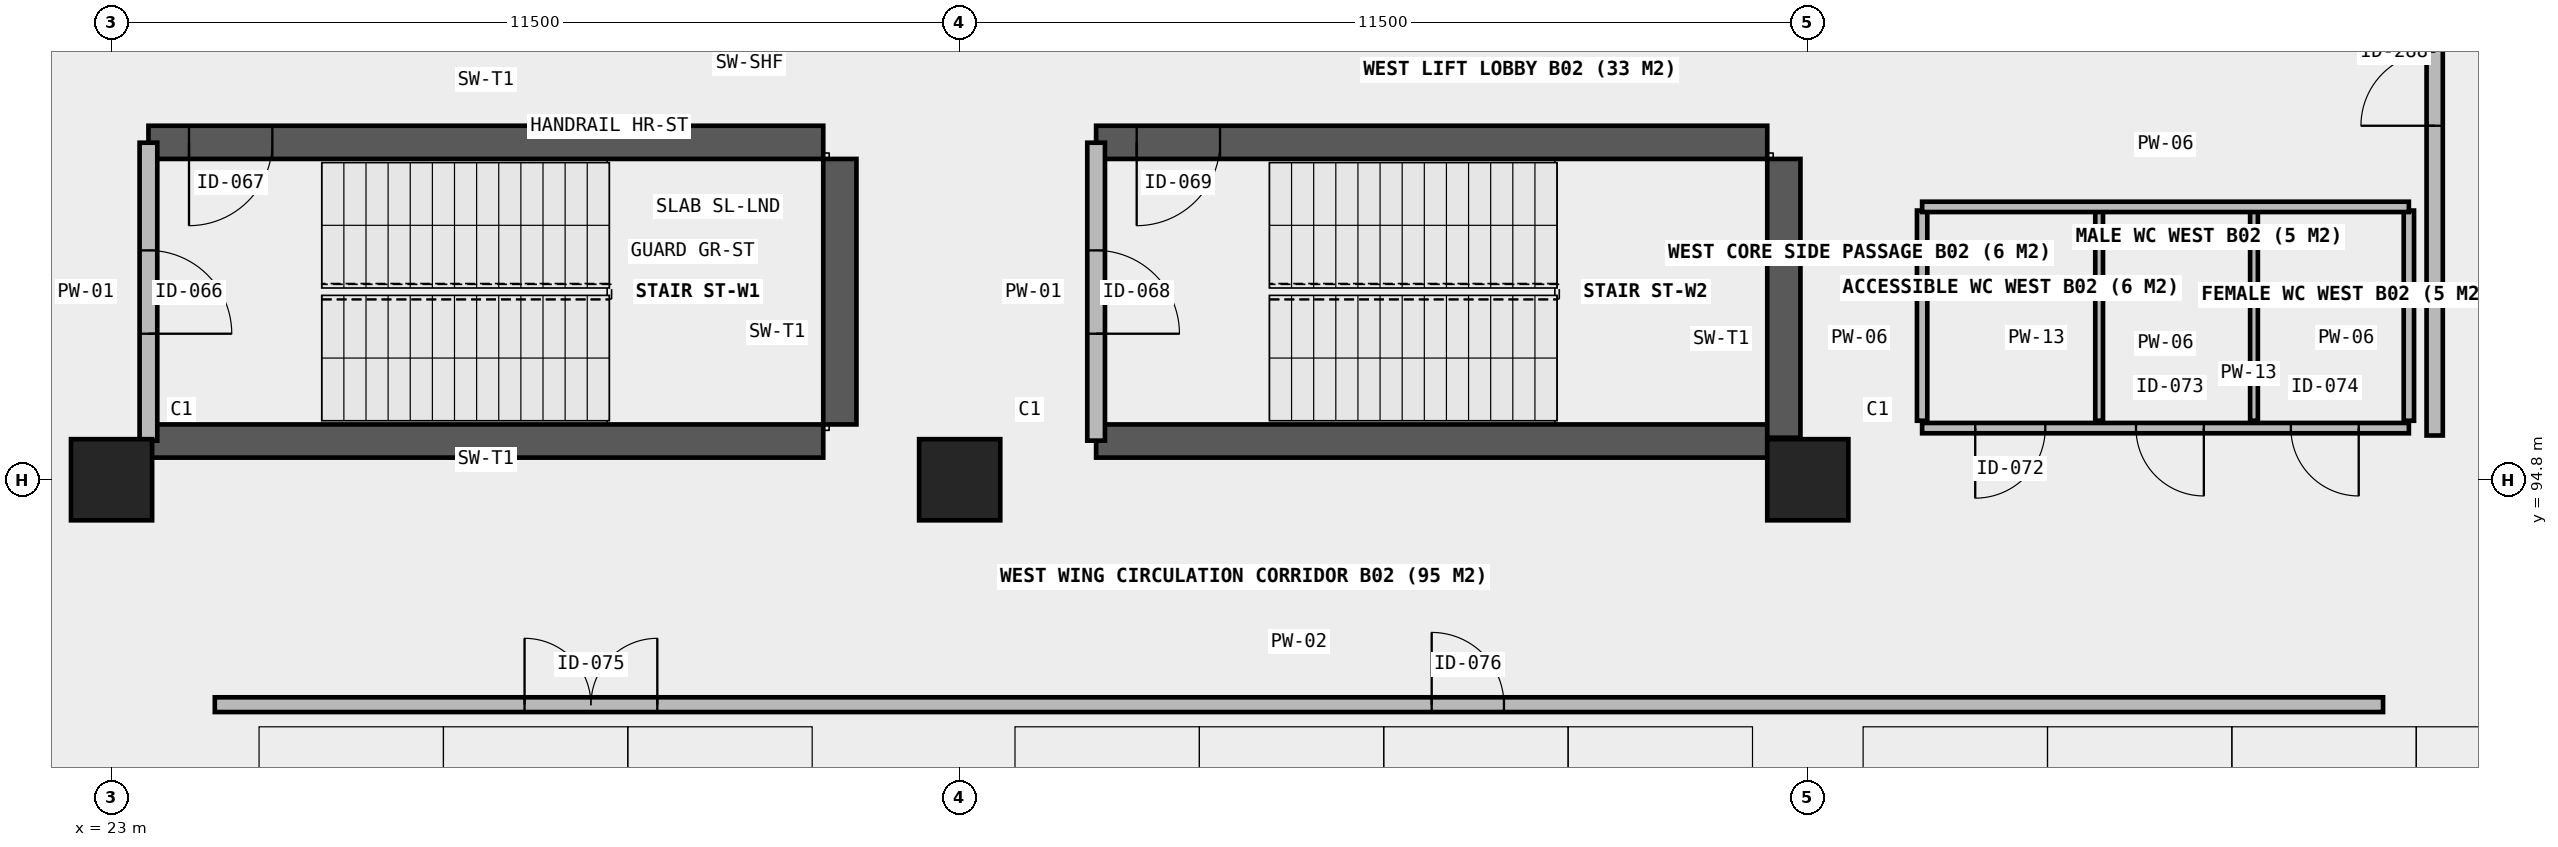
"""IFC4 building model, lengths in metres.
Left out: names, types, materials, properties, quantities, classifications, styles, units other than length and angle.
Written with IfcOpenShell. Run it as: python <this file> out.ifc"""

import sys

from ifc_helpers import new_model, si_unit, direction, frame, frame_2d, origin, origin_2d, place, context, subcontext, project, spatial, rectangle, extrude, element, fill, save


model = new_model("IFC4")
c1 = context("Model", 3, precision=1e-05, world=origin(), true_north=direction((0.0, 1.0)))
c2 = subcontext(c1, "Body", "Model", "MODEL_VIEW")
j1 = project(units=[si_unit("LENGTHUNIT", "METRE"), si_unit("PLANEANGLEUNIT", "RADIAN")], contexts=[c1])
p1 = place(None, origin())
s1 = spatial("IfcSite", under=j1, at=p1, CompositionType="ELEMENT")
p2 = place(p1, origin())
s2 = spatial("IfcBuilding", under=s1, at=p2, CompositionType="ELEMENT")
p3 = place(p2, frame((0.0, 0.0, -8.4)))
s3 = spatial("IfcBuildingStorey", under=s2, at=p3, CompositionType="ELEMENT", Elevation=-8.4)
for number, where, z_axis, x_axis in (
    (1, (23.0, 94.8, 0.0), (0.0, 0.0, 1.0), (1.0, 0.0, 0.0)),
    (2, (34.5, 94.8, 0.0), (0.0, 0.0, 1.0), (1.0, 0.0, 0.0)),
    (3, (46.0, 94.8, 0.0), (0.0, 0.0, 1.0), (1.0, 0.0, 0.0)),
):
    element("IfcColumn", number, at=place(p3, frame(where, z_axis=z_axis, x_axis=x_axis)), inside=s3, PredefinedType="COLUMN", context=c2, shape_type="SweptSolid", body=[
        extrude(rectangle(XDim=1.1, YDim=1.1, at=origin_2d()), origin(), (0.0, 0.0, 1.0), 4.2),
    ])
p4 = place(p3, frame((23.5, 95.325, 0.0), z_axis=(0.0, 0.0, 1.0), x_axis=(1.0, 0.0, 0.0)))
e4 = element("IfcWall", 4, at=p4, inside=s3, PredefinedType="SHEAR", context=c2, shape_type="SweptSolid", body=[
    extrude(rectangle(XDim=9.15, YDim=0.45, at=frame_2d((4.575, 0.0))), origin(), (0.0, 0.0, 1.0), 4.2),
])
p5 = place(p3, frame((23.5, 99.375, 0.0), z_axis=(0.0, 0.0, 1.0), x_axis=(1.0, 0.0, 0.0)))
e5 = element("IfcWall", 5, at=p5, inside=s3, PredefinedType="SHEAR", context=c2, shape_type="SweptSolid", body=[
    extrude(rectangle(XDim=9.15, YDim=0.45, at=frame_2d((4.575, 0.0))), origin(), (0.0, 0.0, 1.0), 4.2),
])
p6 = place(p5, frame((0.55, 0.0, 0.0)))
e6 = element("IfcOpeningElement", 6, at=p6, cuts=e5, PredefinedType="OPENING", context=c2, shape_type="SweptSolid", body=[
    extrude(rectangle(XDim=1.13, YDim=2.15, at=frame_2d((0.565, 1.075))), frame((0.0, 0.235, 0.0), z_axis=(0.0, -1.0, 0.0), x_axis=(1.0, 0.0, 0.0)), (0.0, 0.0, 1.0), 0.47),
])
p7 = place(p3, frame((32.875, 95.55, 0.0), z_axis=(0.0, 0.0, 1.0), x_axis=(0.0, 1.0, 0.0)))
e7 = element("IfcWall", 7, at=p7, inside=s3, PredefinedType="SHEAR", context=c2, shape_type="SweptSolid", body=[
    extrude(rectangle(XDim=3.6, YDim=0.45, at=frame_2d((1.8, 0.0))), origin(), (0.0, 0.0, 1.0), 4.2),
])
p8 = place(p3, frame((36.35, 95.325, 0.0), z_axis=(0.0, 0.0, 1.0), x_axis=(1.0, 0.0, 0.0)))
e8 = element("IfcWall", 8, at=p8, inside=s3, PredefinedType="SHEAR", context=c2, shape_type="SweptSolid", body=[
    extrude(rectangle(XDim=9.1, YDim=0.45, at=frame_2d((4.55, 0.0))), origin(), (0.0, 0.0, 1.0), 4.2),
])
p9 = place(p3, frame((36.35, 99.375, 0.0), z_axis=(0.0, 0.0, 1.0), x_axis=(1.0, 0.0, 0.0)))
e9 = element("IfcWall", 9, at=p9, inside=s3, PredefinedType="SHEAR", context=c2, shape_type="SweptSolid", body=[
    extrude(rectangle(XDim=9.1, YDim=0.45, at=frame_2d((4.55, 0.0))), origin(), (0.0, 0.0, 1.0), 4.2),
])
p10 = place(p9, frame((0.55, 0.0, 0.0)))
e10 = element("IfcOpeningElement", 10, at=p10, cuts=e9, PredefinedType="OPENING", context=c2, shape_type="SweptSolid", body=[
    extrude(rectangle(XDim=1.13, YDim=2.15, at=frame_2d((0.565, 1.075))), frame((0.0, 0.235, 0.0), z_axis=(0.0, -1.0, 0.0), x_axis=(1.0, 0.0, 0.0)), (0.0, 0.0, 1.0), 0.47),
])
p11 = place(p3, frame((45.675, 95.37, 0.0), z_axis=(0.0, 0.0, 1.0), x_axis=(0.0, 1.0, 0.0)))
e11 = element("IfcWall", 11, at=p11, inside=s3, PredefinedType="SHEAR", context=c2, shape_type="SweptSolid", body=[
    extrude(rectangle(XDim=3.78, YDim=0.45, at=frame_2d((1.89, 0.0))), origin(), (0.0, 0.0, 1.0), 4.2),
])
p12 = place(p3, frame((23.5, 95.33, 0.0), z_axis=(0.0, 0.0, 1.0), x_axis=(0.0, 1.0, 0.0)))
e12 = element("IfcWall", 12, at=p12, inside=s3, PredefinedType="SOLIDWALL", context=c2, shape_type="SweptSolid", body=[
    extrude(rectangle(XDim=4.04, YDim=0.24, at=frame_2d((2.02, 0.0))), origin(), (0.0, 0.0, 1.0), 3.9),
])
p13 = place(p12, frame((1.45, 0.0, 0.0)))
e13 = element("IfcOpeningElement", 13, at=p13, cuts=e12, PredefinedType="OPENING", context=c2, shape_type="SweptSolid", body=[
    extrude(rectangle(XDim=1.13, YDim=2.15, at=frame_2d((0.565, 1.075))), frame((0.0, 0.13, 0.0), z_axis=(0.0, -1.0, 0.0), x_axis=(1.0, 0.0, 0.0)), (0.0, 0.0, 1.0), 0.26),
])
p14 = place(p3, frame((36.35, 95.33, 0.0), z_axis=(0.0, 0.0, 1.0), x_axis=(0.0, 1.0, 0.0)))
e14 = element("IfcWall", 14, at=p14, inside=s3, PredefinedType="SOLIDWALL", context=c2, shape_type="SweptSolid", body=[
    extrude(rectangle(XDim=4.04, YDim=0.24, at=frame_2d((2.02, 0.0))), origin(), (0.0, 0.0, 1.0), 3.9),
])
p15 = place(p14, frame((1.45, 0.0, 0.0)))
e15 = element("IfcOpeningElement", 15, at=p15, cuts=e14, PredefinedType="OPENING", context=c2, shape_type="SweptSolid", body=[
    extrude(rectangle(XDim=1.13, YDim=2.15, at=frame_2d((0.565, 1.075))), frame((0.0, 0.13, 0.0), z_axis=(0.0, -1.0, 0.0), x_axis=(1.0, 0.0, 0.0)), (0.0, 0.0, 1.0), 0.26),
])
p16 = place(p3, frame((47.55, 95.5, 0.0), z_axis=(0.0, 0.0, 1.0), x_axis=(1.0, 0.0, 0.0)))
e16 = element("IfcWall", 16, at=p16, inside=s3, PredefinedType="PLUMBINGWALL", context=c2, shape_type="SweptSolid", body=[
    extrude(rectangle(XDim=6.6, YDim=0.14, at=frame_2d((3.3, 0.0))), origin(), (0.0, 0.0, 1.0), 3.9),
])
p17 = place(p16, frame((0.72, 0.0, 0.0)))
e17 = element("IfcOpeningElement", 17, at=p17, cuts=e16, PredefinedType="OPENING", context=c2, shape_type="SweptSolid", body=[
    extrude(rectangle(XDim=0.95, YDim=2.1, at=frame_2d((0.475, 1.05))), frame((0.0, 0.08, 0.0), z_axis=(0.0, -1.0, 0.0), x_axis=(1.0, 0.0, 0.0)), (0.0, 0.0, 1.0), 0.16),
])
p18 = place(p16, frame((2.9, 0.0, 0.0)))
e18 = element("IfcOpeningElement", 18, at=p18, cuts=e16, PredefinedType="OPENING", context=c2, shape_type="SweptSolid", body=[
    extrude(rectangle(XDim=0.92, YDim=2.1, at=frame_2d((0.46, 1.05))), frame((0.0, 0.08, 0.0), z_axis=(0.0, -1.0, 0.0), x_axis=(1.0, 0.0, 0.0)), (0.0, 0.0, 1.0), 0.16),
])
p19 = place(p16, frame((5.0, 0.0, 0.0)))
e19 = element("IfcOpeningElement", 19, at=p19, cuts=e16, PredefinedType="OPENING", context=c2, shape_type="SweptSolid", body=[
    extrude(rectangle(XDim=0.92, YDim=2.1, at=frame_2d((0.46, 1.05))), frame((0.0, 0.08, 0.0), z_axis=(0.0, -1.0, 0.0), x_axis=(1.0, 0.0, 0.0)), (0.0, 0.0, 1.0), 0.16),
])
p20 = place(p3, frame((47.55, 95.6, 0.0), z_axis=(0.0, 0.0, 1.0), x_axis=(0.0, 1.0, 0.0)))
e20 = element("IfcWall", 20, at=p20, inside=s3, PredefinedType="PLUMBINGWALL", context=c2, shape_type="SweptSolid", body=[
    extrude(rectangle(XDim=2.85, YDim=0.14, at=frame_2d((1.425, 0.0))), origin(), (0.0, 0.0, 1.0), 3.9),
])
p21 = place(p3, frame((49.95, 95.6, 0.0), z_axis=(0.0, 0.0, 1.0), x_axis=(0.0, 1.0, 0.0)))
e21 = element("IfcWall", 21, at=p21, inside=s3, PredefinedType="PARTITIONING", context=c2, shape_type="SweptSolid", body=[
    extrude(rectangle(XDim=2.85, YDim=0.105, at=frame_2d((1.425, 0.0))), origin(), (0.0, 0.0, 1.0), 3.37),
])
p22 = place(p3, frame((52.05, 95.6, 0.0), z_axis=(0.0, 0.0, 1.0), x_axis=(0.0, 1.0, 0.0)))
e22 = element("IfcWall", 22, at=p22, inside=s3, PredefinedType="PARTITIONING", context=c2, shape_type="SweptSolid", body=[
    extrude(rectangle(XDim=2.85, YDim=0.105, at=frame_2d((1.425, 0.0))), origin(), (0.0, 0.0, 1.0), 3.9),
])
p23 = place(p3, frame((54.15, 95.6, 0.0), z_axis=(0.0, 0.0, 1.0), x_axis=(0.0, 1.0, 0.0)))
e23 = element("IfcWall", 23, at=p23, inside=s3, PredefinedType="PLUMBINGWALL", context=c2, shape_type="SweptSolid", body=[
    extrude(rectangle(XDim=2.85, YDim=0.14, at=frame_2d((1.425, 0.0))), origin(), (0.0, 0.0, 1.0), 3.9),
])
p24 = place(p3, frame((47.55, 98.5, 0.0), z_axis=(0.0, 0.0, 1.0), x_axis=(1.0, 0.0, 0.0)))
e24 = element("IfcWall", 24, at=p24, inside=s3, PredefinedType="PLUMBINGWALL", context=c2, shape_type="SweptSolid", body=[
    extrude(rectangle(XDim=6.6, YDim=0.14, at=frame_2d((3.3, 0.0))), origin(), (0.0, 0.0, 1.0), 3.9),
])
p25 = place(p3, frame((24.4, 91.75, 0.0), z_axis=(0.0, 0.0, 1.0), x_axis=(1.0, 0.0, 0.0)))
e25 = element("IfcWall", 25, at=p25, inside=s3, PredefinedType="PARTITIONING", context=c2, shape_type="SweptSolid", body=[
    extrude(rectangle(XDim=29.4, YDim=0.2, at=frame_2d((14.7, 0.0))), origin(), (0.0, 0.0, 1.0), 3.9),
])
p26 = place(p25, frame((4.2, 0.0, 0.0)))
e26 = element("IfcOpeningElement", 26, at=p26, cuts=e25, PredefinedType="OPENING", context=c2, shape_type="SweptSolid", body=[
    extrude(rectangle(XDim=1.8, YDim=2.2, at=frame_2d((0.9, 1.1))), frame((0.0, 0.11, 0.0), z_axis=(0.0, -1.0, 0.0), x_axis=(1.0, 0.0, 0.0)), (0.0, 0.0, 1.0), 0.22),
])
p27 = place(p25, frame((16.5, 0.0, 0.0)))
e27 = element("IfcOpeningElement", 27, at=p27, cuts=e25, PredefinedType="OPENING", context=c2, shape_type="SweptSolid", body=[
    extrude(rectangle(XDim=0.98, YDim=2.15, at=frame_2d((0.49, 1.075))), frame((0.0, 0.11, 0.0), z_axis=(0.0, -1.0, 0.0), x_axis=(1.0, 0.0, 0.0)), (0.0, 0.0, 1.0), 0.22),
])
p28 = place(p3, frame((54.5, 95.4, 0.0), z_axis=(0.0, 0.0, 1.0), x_axis=(0.0, 1.0, 0.0)))
e28 = element("IfcWall", 28, at=p28, inside=s3, PredefinedType="SOLIDWALL", context=c2, shape_type="SweptSolid", body=[
    extrude(rectangle(XDim=18.8, YDim=0.22, at=frame_2d((9.4, 0.0))), origin(), (0.0, 0.0, 1.0), 3.9),
])
p29 = place(p28, frame((4.2, 0.0, 0.0)))
e29 = element("IfcOpeningElement", 29, at=p29, cuts=e28, PredefinedType="OPENING", context=c2, shape_type="SweptSolid", body=[
    extrude(rectangle(XDim=2.0, YDim=2.3, at=frame_2d((1.0, 1.15))), frame((0.0, 0.12, 0.0), z_axis=(0.0, -1.0, 0.0), x_axis=(1.0, 0.0, 0.0)), (0.0, 0.0, 1.0), 0.24),
])
p30 = place(p13, frame((0.565, 0.0, 0.0), z_axis=(0.0, 0.0, 1.0), x_axis=(-1.0, 0.0, 0.0)))
e30 = element("IfcDoor", 30, at=p30, inside=s3, OperationType="SINGLE_SWING_LEFT", PredefinedType="DOOR", context=c2, shape_type="SweptSolid", body=[
    extrude(rectangle(XDim=1.13, YDim=2.15, at=frame_2d((0.0, 1.075))), frame((0.0, 0.025, 0.0), z_axis=(0.0, -1.0, 0.0), x_axis=(1.0, 0.0, 0.0)), (0.0, 0.0, 1.0), 0.05),
])
fill(e13, e30)
p31 = place(p6, frame((0.565, 0.0, 0.0), z_axis=(0.0, 0.0, 1.0), x_axis=(-1.0, 0.0, 0.0)))
e31 = element("IfcDoor", 31, at=p31, inside=s3, OperationType="SINGLE_SWING_LEFT", PredefinedType="DOOR", context=c2, shape_type="SweptSolid", body=[
    extrude(rectangle(XDim=1.13, YDim=2.15, at=frame_2d((0.0, 1.075))), frame((0.0, 0.025, 0.0), z_axis=(0.0, -1.0, 0.0), x_axis=(1.0, 0.0, 0.0)), (0.0, 0.0, 1.0), 0.05),
])
fill(e6, e31)
p32 = place(p15, frame((0.565, 0.0, 0.0), z_axis=(0.0, 0.0, 1.0), x_axis=(-1.0, 0.0, 0.0)))
e32 = element("IfcDoor", 32, at=p32, inside=s3, OperationType="SINGLE_SWING_LEFT", PredefinedType="DOOR", context=c2, shape_type="SweptSolid", body=[
    extrude(rectangle(XDim=1.13, YDim=2.15, at=frame_2d((0.0, 1.075))), frame((0.0, 0.025, 0.0), z_axis=(0.0, -1.0, 0.0), x_axis=(1.0, 0.0, 0.0)), (0.0, 0.0, 1.0), 0.05),
])
fill(e15, e32)
p33 = place(p10, frame((0.565, 0.0, 0.0), z_axis=(0.0, 0.0, 1.0), x_axis=(-1.0, 0.0, 0.0)))
e33 = element("IfcDoor", 33, at=p33, inside=s3, OperationType="SINGLE_SWING_LEFT", PredefinedType="DOOR", context=c2, shape_type="SweptSolid", body=[
    extrude(rectangle(XDim=1.13, YDim=2.15, at=frame_2d((0.0, 1.075))), frame((0.0, 0.025, 0.0), z_axis=(0.0, -1.0, 0.0), x_axis=(1.0, 0.0, 0.0)), (0.0, 0.0, 1.0), 0.05),
])
fill(e10, e33)
p34 = place(p17, frame((0.475, 0.0, 0.0), z_axis=(0.0, 0.0, 1.0), x_axis=(-1.0, 0.0, 0.0)))
e34 = element("IfcDoor", 34, at=p34, inside=s3, OperationType="SINGLE_SWING_LEFT", PredefinedType="DOOR", context=c2, shape_type="SweptSolid", body=[
    extrude(rectangle(XDim=0.95, YDim=2.1, at=frame_2d((0.0, 1.05))), frame((0.0, 0.025, 0.0), z_axis=(0.0, -1.0, 0.0), x_axis=(1.0, 0.0, 0.0)), (0.0, 0.0, 1.0), 0.05),
])
fill(e17, e34)
p35 = place(p18, origin())
e35 = element("IfcDoor", 35, at=p35, inside=s3, OperationType="SINGLE_SWING_RIGHT", PredefinedType="DOOR", context=c2, shape_type="SweptSolid", body=[
    extrude(rectangle(XDim=0.92, YDim=2.1, at=frame_2d((0.46, 1.05))), frame((0.0, 0.025, 0.0), z_axis=(0.0, -1.0, 0.0), x_axis=(1.0, 0.0, 0.0)), (0.0, 0.0, 1.0), 0.05),
])
fill(e18, e35)
p36 = place(p19, origin())
e36 = element("IfcDoor", 36, at=p36, inside=s3, OperationType="SINGLE_SWING_RIGHT", PredefinedType="DOOR", context=c2, shape_type="SweptSolid", body=[
    extrude(rectangle(XDim=0.92, YDim=2.1, at=frame_2d((0.46, 1.05))), frame((0.0, 0.025, 0.0), z_axis=(0.0, -1.0, 0.0), x_axis=(1.0, 0.0, 0.0)), (0.0, 0.0, 1.0), 0.05),
])
fill(e19, e36)
p37 = place(p26, origin())
e37 = element("IfcDoor", 37, at=p37, inside=s3, OperationType="DOUBLE_DOOR_SINGLE_SWING", PredefinedType="DOOR", context=c2, shape_type="SweptSolid", body=[
    extrude(rectangle(XDim=1.8, YDim=2.2, at=frame_2d((0.9, 1.1))), frame((0.0, 0.025, 0.0), z_axis=(0.0, -1.0, 0.0), x_axis=(1.0, 0.0, 0.0)), (0.0, 0.0, 1.0), 0.05),
])
fill(e26, e37)
p38 = place(p27, origin())
e38 = element("IfcDoor", 38, at=p38, inside=s3, OperationType="SINGLE_SWING_LEFT", PredefinedType="DOOR", context=c2, shape_type="SweptSolid", body=[
    extrude(rectangle(XDim=0.98, YDim=2.15, at=frame_2d((0.49, 1.075))), frame((0.0, 0.025, 0.0), z_axis=(0.0, -1.0, 0.0), x_axis=(1.0, 0.0, 0.0)), (0.0, 0.0, 1.0), 0.05),
])
fill(e27, e38)
p39 = place(p29, origin())
e39 = element("IfcDoor", 39, at=p39, inside=s3, OperationType="DOUBLE_DOOR_SINGLE_SWING", PredefinedType="DOOR", context=c2, shape_type="SweptSolid", body=[
    extrude(rectangle(XDim=2.0, YDim=2.3, at=frame_2d((1.0, 1.15))), frame((0.0, 0.025, 0.0), z_axis=(0.0, -1.0, 0.0), x_axis=(1.0, 0.0, 0.0)), (0.0, 0.0, 1.0), 0.05),
])
fill(e29, e39)
save(model, sys.argv[1])
